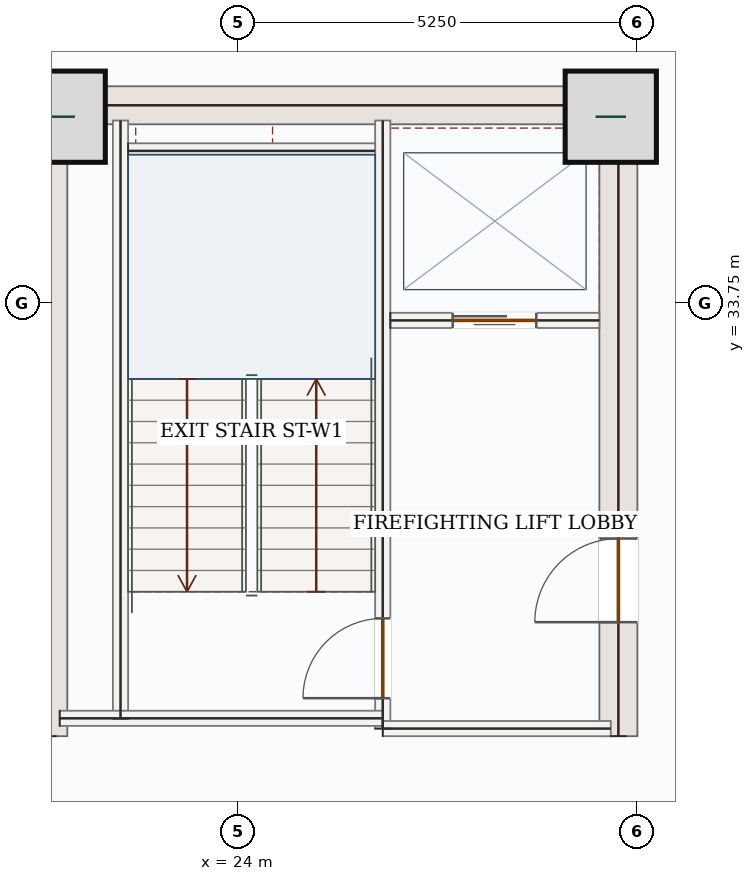
"""IFC4 building model, lengths in metres.
Left out: names, types, materials, properties, quantities, classifications, styles, units other than length and angle.
Written with IfcOpenShell. Run it as: python <this file> out.ifc"""

import sys

from ifc_helpers import new_model, si_unit, direction, frame, frame_2d, origin, origin_2d, place, context, subcontext, project, spatial, rectangle, extrude, source, transform, mapped, element, fill, save


model = new_model("IFC4")
c1 = context("Model", 3, precision=1e-05, world=origin(), true_north=direction((0.0, 1.0)))
c2 = subcontext(c1, "Body", "Model", "MODEL_VIEW")
j1 = project(units=[si_unit("LENGTHUNIT", "METRE"), si_unit("PLANEANGLEUNIT", "RADIAN")], contexts=[c1])
p1 = place(None, origin())
s1 = spatial("IfcSite", under=j1, at=p1, CompositionType="ELEMENT")
p2 = place(p1, origin())
s2 = spatial("IfcBuilding", under=s1, at=p2, CompositionType="ELEMENT")
p3 = place(p2, frame((0.0, 0.0, 170.7)))
s3 = spatial("IfcBuildingStorey", under=s2, at=p3, CompositionType="ELEMENT", Elevation=170.7)
m1 = source(origin(), c2, "Body", "SweptSolid", [
    extrude(rectangle(XDim=8.55, YDim=0.5, at=frame_2d((4.275, 0.0))), origin(), (0.0, 0.0, 1.0), 3.62),
])
p4 = place(p3, frame((21.5, 28.05, 0.0), z_axis=(0.0, 0.0, 1.0), x_axis=(0.0, 1.0, 0.0)))
e1 = element("IfcWall", 1, at=p4, inside=s3, PredefinedType="SHEAR", context=c2, shape_type="MappedRepresentation", body=[
    mapped(m1, transform((0.0, 0.0, 0.0), x_axis=(1.0, 0.0, 0.0), y_axis=(0.0, 1.0, 0.0), z_axis=(0.0, 0.0, 1.0), scale=1.0)),
])
p5 = place(p3, frame((29.0, 28.05, 0.0), z_axis=(0.0, 0.0, 1.0), x_axis=(0.0, 1.0, 0.0)))
e2 = element("IfcWall", 2, at=p5, inside=s3, PredefinedType="SHEAR", context=c2, shape_type="SweptSolid", body=[
    extrude(rectangle(XDim=8.55, YDim=0.5, at=frame_2d((4.275, 0.0))), origin(), (0.0, 0.0, 1.0), 3.62),
])
p6 = place(p5, frame((1.5, 0.0, 0.0)))
e3 = element("IfcOpeningElement", 3, at=p6, cuts=e2, PredefinedType="OPENING", context=c2, shape_type="SweptSolid", body=[
    extrude(rectangle(XDim=1.1, YDim=2.2, at=frame_2d((0.55, 1.1))), frame((0.0, 0.26, 0.0), z_axis=(0.0, -1.0, 0.0), x_axis=(1.0, 0.0, 0.0)), (0.0, 0.0, 1.0), 0.52),
])
m2 = source(origin(), c2, "Body", "SweptSolid", [
    extrude(rectangle(XDim=7.0, YDim=0.5, at=frame_2d((3.5, 0.0))), origin(), (0.0, 0.0, 1.0), 3.62),
])
p7 = place(p3, frame((21.75, 36.35, 0.0), z_axis=(0.0, 0.0, 1.0), x_axis=(1.0, 0.0, 0.0)))
e4 = element("IfcWall", 4, at=p7, inside=s3, PredefinedType="SHEAR", context=c2, shape_type="MappedRepresentation", body=[
    mapped(m2, transform((0.0, 0.0, 0.0), x_axis=(1.0, 0.0, 0.0), y_axis=(0.0, 1.0, 0.0), z_axis=(0.0, 0.0, 1.0), scale=1.0)),
])
m3 = source(origin(), c2, "Body", "SweptSolid", [
    extrude(rectangle(XDim=1.2, YDim=1.2, at=origin_2d()), origin(), (0.0, 0.0, 1.0), 3.9),
])
for number, where, z_axis, x_axis in (
    (5, (21.65, 36.2, 0.0), (0.0, 0.0, 1.0), (1.0, 0.0, 0.0)),
    (6, (28.9, 36.2, 0.0), (0.0, 0.0, 1.0), (1.0, 0.0, 0.0)),
):
    element("IfcColumn", number, at=place(p3, frame(where, z_axis=z_axis, x_axis=x_axis)), inside=s3, PredefinedType="COLUMN", context=c2, shape_type="MappedRepresentation", body=[
        mapped(m3, transform((0.0, 0.0, 0.0), x_axis=(1.0, 0.0, 0.0), y_axis=(0.0, 1.0, 0.0), z_axis=(0.0, 0.0, 1.0), scale=1.0)),
    ])
m4 = source(origin(), c2, "Body", "SweptSolid", [
    extrude(rectangle(XDim=5.258, YDim=0.28, at=frame_2d((2.629, 0.0))), origin(), (0.0, 0.0, 1.0), 3.62),
])
p8 = place(p3, frame((18.94, 35.542, 0.0), z_axis=(0.0, 0.0, 1.0), x_axis=(0.707106781187, 0.707106781187, 0.0)))
e7 = element("IfcWall", 7, at=p8, inside=s3, PredefinedType="SOLIDWALL", context=c2, shape_type="MappedRepresentation", body=[
    mapped(m4, transform((0.0, 0.0, 0.0), x_axis=(1.0, 0.0, 0.0), y_axis=(0.0, 1.0, 0.0), z_axis=(0.0, 0.0, 1.0), scale=1.0)),
])
m5 = source(origin(), c2, "Body", "SweptSolid", [
    extrude(rectangle(XDim=7.87, YDim=0.2, at=frame_2d((3.935, 0.0))), origin(), (0.0, 0.0, 1.0), 3.62),
])
p9 = place(p3, frame((22.45, 28.28, 0.0), z_axis=(0.0, 0.0, 1.0), x_axis=(0.0, 1.0, 0.0)))
e8 = element("IfcWall", 8, at=p9, inside=s3, PredefinedType="SOLIDWALL", context=c2, shape_type="MappedRepresentation", body=[
    mapped(m5, transform((0.0, 0.0, 0.0), x_axis=(1.0, 0.0, 0.0), y_axis=(0.0, 1.0, 0.0), z_axis=(0.0, 0.0, 1.0), scale=1.0)),
])
p10 = place(p3, frame((25.9, 28.15, 0.0), z_axis=(0.0, 0.0, 1.0), x_axis=(0.0, 1.0, 0.0)))
e9 = element("IfcWall", 9, at=p10, inside=s3, PredefinedType="SOLIDWALL", context=c2, shape_type="SweptSolid", body=[
    extrude(rectangle(XDim=8.0, YDim=0.2, at=frame_2d((4.0, 0.0))), origin(), (0.0, 0.0, 1.0), 3.62),
])
p11 = place(p10, frame((0.4, 0.0, 0.0)))
e10 = element("IfcOpeningElement", 10, at=p11, cuts=e9, PredefinedType="OPENING", context=c2, shape_type="SweptSolid", body=[
    extrude(rectangle(XDim=1.05, YDim=2.15, at=frame_2d((0.525, 1.075))), frame((0.0, 0.11, 0.0), z_axis=(0.0, -1.0, 0.0), x_axis=(1.0, 0.0, 0.0)), (0.0, 0.0, 1.0), 0.22),
])
m6 = source(origin(), c2, "Body", "SweptSolid", [
    extrude(rectangle(XDim=4.25, YDim=0.2, at=frame_2d((2.125, 0.0))), origin(), (0.0, 0.0, 1.0), 3.62),
])
p12 = place(p3, frame((21.65, 28.285, 0.0), z_axis=(0.0, 0.0, 1.0), x_axis=(1.0, 0.0, 0.0)))
e11 = element("IfcWall", 11, at=p12, inside=s3, PredefinedType="SOLIDWALL", context=c2, shape_type="MappedRepresentation", body=[
    mapped(m6, transform((0.0, 0.0, 0.0), x_axis=(1.0, 0.0, 0.0), y_axis=(0.0, 1.0, 0.0), z_axis=(0.0, 0.0, 1.0), scale=1.0)),
])
m7 = source(origin(), c2, "Body", "SweptSolid", [
    extrude(rectangle(XDim=3.0, YDim=0.2, at=frame_2d((1.5, 0.0))), origin(), (0.0, 0.0, 1.0), 3.62),
])
p13 = place(p3, frame((25.9, 28.15, 0.0), z_axis=(0.0, 0.0, 1.0), x_axis=(1.0, 0.0, 0.0)))
e12 = element("IfcWall", 12, at=p13, inside=s3, PredefinedType="SOLIDWALL", context=c2, shape_type="MappedRepresentation", body=[
    mapped(m7, transform((0.0, 0.0, 0.0), x_axis=(1.0, 0.0, 0.0), y_axis=(0.0, 1.0, 0.0), z_axis=(0.0, 0.0, 1.0), scale=1.0)),
])
m8 = source(origin(), c2, "Body", "SweptSolid", [
    extrude(rectangle(XDim=3.25, YDim=0.2, at=frame_2d((1.625, 0.0))), origin(), (0.0, 0.0, 1.0), 3.62),
])
p14 = place(p3, frame((22.55, 35.75, 0.0), z_axis=(0.0, 0.0, 1.0), x_axis=(1.0, 0.0, 0.0)))
e13 = element("IfcWall", 13, at=p14, inside=s3, PredefinedType="SOLIDWALL", context=c2, shape_type="MappedRepresentation", body=[
    mapped(m8, transform((0.0, 0.0, 0.0), x_axis=(1.0, 0.0, 0.0), y_axis=(0.0, 1.0, 0.0), z_axis=(0.0, 0.0, 1.0), scale=1.0)),
])
p15 = place(p3, frame((26.0, 33.52, 0.0), z_axis=(0.0, 0.0, 1.0), x_axis=(1.0, 0.0, 0.0)))
e14 = element("IfcWall", 14, at=p15, inside=s3, PredefinedType="SOLIDWALL", context=c2, shape_type="SweptSolid", body=[
    extrude(rectangle(XDim=2.75, YDim=0.2, at=frame_2d((1.375, 0.0))), origin(), (0.0, 0.0, 1.0), 3.62),
])
p16 = place(p15, frame((0.82, 0.0, 0.0)))
e15 = element("IfcOpeningElement", 15, at=p16, cuts=e14, PredefinedType="OPENING", context=c2, shape_type="SweptSolid", body=[
    extrude(rectangle(XDim=1.1, YDim=2.15, at=frame_2d((0.55, 1.075))), frame((0.0, 0.11, 0.0), z_axis=(0.0, -1.0, 0.0), x_axis=(1.0, 0.0, 0.0)), (0.0, 0.0, 1.0), 0.22),
])
m9 = source(origin(), c2, "Body", "SweptSolid", [
    extrude(rectangle(XDim=1.05, YDim=2.15, at=frame_2d((0.525, 1.075))), frame((0.0, 0.025, 0.0), z_axis=(0.0, -1.0, 0.0), x_axis=(1.0, 0.0, 0.0)), (0.0, 0.0, 1.0), 0.05),
])
p17 = place(p11, origin())
e16 = element("IfcDoor", 16, at=p17, inside=s3, OperationType="SINGLE_SWING_LEFT", PredefinedType="DOOR", context=c2, shape_type="MappedRepresentation", body=[
    mapped(m9, transform((0.0, 0.0, 0.0), x_axis=(1.0, 0.0, 0.0), y_axis=(0.0, 1.0, 0.0), z_axis=(0.0, 0.0, 1.0), scale=1.0)),
])
fill(e10, e16)
m10 = source(origin(), c2, "Body", "SweptSolid", [
    extrude(rectangle(XDim=1.1, YDim=2.15, at=frame_2d((0.55, 1.075))), frame((0.0, 0.025, 0.0), z_axis=(0.0, -1.0, 0.0), x_axis=(1.0, 0.0, 0.0)), (0.0, 0.0, 1.0), 0.05),
])
p18 = place(p16, origin())
e17 = element("IfcDoor", 17, at=p18, inside=s3, OperationType="DOUBLE_DOOR_SLIDING", PredefinedType="DOOR", context=c2, shape_type="MappedRepresentation", body=[
    mapped(m10, transform((0.0, 0.0, 0.0), x_axis=(1.0, 0.0, 0.0), y_axis=(0.0, 1.0, 0.0), z_axis=(0.0, 0.0, 1.0), scale=1.0)),
])
fill(e15, e17)
m11 = source(origin(), c2, "Body", "SweptSolid", [
    extrude(rectangle(XDim=1.1, YDim=2.2, at=frame_2d((0.55, 1.1))), frame((0.0, 0.025, 0.0), z_axis=(0.0, -1.0, 0.0), x_axis=(1.0, 0.0, 0.0)), (0.0, 0.0, 1.0), 0.05),
])
p19 = place(p6, origin())
e18 = element("IfcDoor", 18, at=p19, inside=s3, OperationType="SINGLE_SWING_LEFT", PredefinedType="DOOR", context=c2, shape_type="MappedRepresentation", body=[
    mapped(m11, transform((0.0, 0.0, 0.0), x_axis=(1.0, 0.0, 0.0), y_axis=(0.0, 1.0, 0.0), z_axis=(0.0, 0.0, 1.0), scale=1.0)),
])
fill(e3, e18)
save(model, sys.argv[1])
